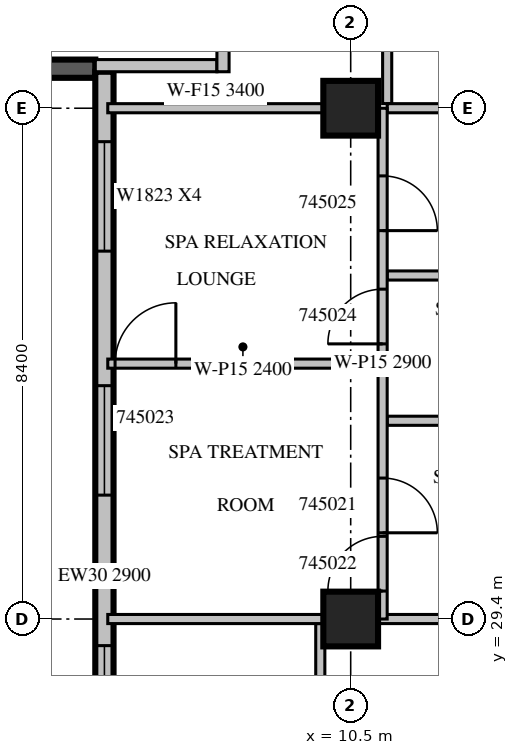
"""IFC4 building model, lengths in metres.
Left out: names, types, materials, properties, quantities, classifications, styles, units other than length and angle.
Written with IfcOpenShell. Run it as: python <this file> out.ifc"""

import sys

from ifc_helpers import new_model, si_unit, direction, frame, frame_2d, origin, origin_2d, place, context, subcontext, project, spatial, rectangle, extrude, source, transform, mapped, element, fill, save


model = new_model("IFC4")
c1 = context("Model", 3, precision=1e-05, world=origin(), true_north=direction((0.0, 1.0)))
c2 = subcontext(c1, "Body", "Model", "MODEL_VIEW")
j1 = project(units=[si_unit("LENGTHUNIT", "METRE"), si_unit("PLANEANGLEUNIT", "RADIAN")], contexts=[c1])
p1 = place(None, origin())
s1 = spatial("IfcSite", under=j1, at=p1, CompositionType="ELEMENT")
p2 = place(p1, origin())
s2 = spatial("IfcBuilding", under=s1, at=p2, CompositionType="ELEMENT")
p3 = place(p2, frame((0.0, 0.0, 204.4)))
s3 = spatial("IfcBuildingStorey", under=s2, at=p3, CompositionType="ELEMENT", Elevation=204.4)
m1 = source(origin(), c2, "Body", "SweptSolid", [
    extrude(rectangle(XDim=0.9, YDim=0.9, at=origin_2d()), origin(), (0.0, 0.0, 1.0), 3.8),
])
for number, where, z_axis, x_axis in (
    (1, (10.5, 29.4, 0.0), (0.0, 0.0, 1.0), (1.0, 0.0, 0.0)),
    (2, (10.5, 37.8, 0.0), (0.0, 0.0, 1.0), (1.0, 0.0, 0.0)),
):
    element("IfcColumn", number, at=place(p3, frame(where, z_axis=z_axis, x_axis=x_axis)), inside=s3, PredefinedType="COLUMN", context=c2, shape_type="MappedRepresentation", body=[
        mapped(m1, transform((0.0, 0.0, 0.0), scale=1.0)),
    ])
m2 = source(origin(), c2, "Body", "SweptSolid", [
    extrude(rectangle(XDim=6.1, YDim=0.3, at=frame_2d((3.05, 0.0))), origin(), (0.0, 0.0, 1.0), 3.4),
])
p4 = place(p3, frame((0.2, 38.45, 0.0), z_axis=(0.0, 0.0, 1.0), x_axis=(1.0, 0.0, 0.0)))
e3 = element("IfcWall", 3, at=p4, inside=s3, PredefinedType="SOLIDWALL", context=c2, shape_type="MappedRepresentation", body=[
    mapped(m2, transform((0.0, 0.0, 0.0), scale=1.0)),
])
p5 = place(p3, frame((6.45, 38.4, 0.0), z_axis=(0.0, 0.0, 1.0), x_axis=(0.0, -1.0, 0.0)))
e4 = element("IfcWall", 4, at=p5, inside=s3, PredefinedType="STANDARD", context=c2, shape_type="SweptSolid", body=[
    extrude(rectangle(XDim=16.6, YDim=0.3, at=frame_2d((8.3, 0.0))), origin(), (0.0, 0.0, 1.0), 2.9),
])
m3 = source(origin(), c2, "Body", "SweptSolid", [
    extrude(rectangle(XDim=1.8, YDim=2.3, at=frame_2d((0.9, 1.15))), frame((0.0, 0.16, 0.0), z_axis=(0.0, -1.0, 0.0), x_axis=(1.0, 0.0, 0.0)), (0.0, 0.0, 1.0), 0.32),
])
p6 = place(p5, frame((1.15, 0.0, 0.6)))
e5 = element("IfcOpeningElement", 5, at=p6, cuts=e4, PredefinedType="OPENING", context=c2, shape_type="MappedRepresentation", body=[
    mapped(m3, transform((0.0, 0.0, 0.0), scale=1.0)),
])
p7 = place(p5, frame((5.162, 0.0, 0.6)))
e6 = element("IfcOpeningElement", 6, at=p7, cuts=e4, PredefinedType="OPENING", context=c2, shape_type="MappedRepresentation", body=[
    mapped(m3, transform((0.0, 0.0, 0.0), scale=1.0)),
])
p8 = place(p5, frame((9.438, 0.0, 0.6)))
e7 = element("IfcOpeningElement", 7, at=p8, cuts=e4, PredefinedType="OPENING", context=c2, shape_type="MappedRepresentation", body=[
    mapped(m3, transform((0.0, 0.0, 0.0), scale=1.0)),
])
m4 = source(origin(), c2, "Body", "SweptSolid", [
    extrude(rectangle(XDim=1.2, YDim=2.3, at=frame_2d((0.6, 1.15))), frame((0.0, 0.16, 0.0), z_axis=(0.0, -1.0, 0.0), x_axis=(1.0, 0.0, 0.0)), (0.0, 0.0, 1.0), 0.32),
])
p9 = place(p5, frame((14.338, 0.0, 0.6)))
e8 = element("IfcOpeningElement", 8, at=p9, cuts=e4, PredefinedType="OPENING", context=c2, shape_type="MappedRepresentation", body=[
    mapped(m4, transform((0.0, 0.0, 0.0), scale=1.0)),
])
p10 = place(p5, frame((11.887, 0.0, 0.6)))
e9 = element("IfcOpeningElement", 9, at=p10, cuts=e4, PredefinedType="OPENING", context=c2, shape_type="MappedRepresentation", body=[
    mapped(m3, transform((0.0, 0.0, 0.0), scale=1.0)),
])
m5 = source(origin(), c2, "Body", "SweptSolid", [
    extrude(rectangle(XDim=2.0, YDim=0.2, at=frame_2d((1.0, 0.0))), origin(), (0.0, 0.0, 1.0), 3.4),
])
p11 = place(p3, frame((6.3, 38.5, 0.0), z_axis=(0.0, 0.0, 1.0), x_axis=(1.0, 0.0, 0.0)))
e10 = element("IfcWall", 10, at=p11, inside=s3, PredefinedType="PARTITIONING", context=c2, shape_type="MappedRepresentation", body=[
    mapped(m5, transform((0.0, 0.0, 0.0), scale=1.0)),
])
m6 = source(origin(), c2, "Body", "SweptSolid", [
    extrude(rectangle(XDim=5.45, YDim=0.2, at=frame_2d((2.725, 0.0))), origin(), (0.0, 0.0, 1.0), 3.4),
])
p12 = place(p3, frame((8.4, 38.4, 0.0), z_axis=(0.0, 0.0, 1.0), x_axis=(0.0, 1.0, 0.0)))
e11 = element("IfcWall", 11, at=p12, inside=s3, PredefinedType="PARTITIONING", context=c2, shape_type="MappedRepresentation", body=[
    mapped(m6, transform((0.0, 0.0, 0.0), scale=1.0)),
])
m7 = source(origin(), c2, "Body", "SweptSolid", [
    extrude(rectangle(XDim=1.2, YDim=2.1, at=frame_2d((0.6, 1.05))), frame((0.0, 0.11, 0.0), z_axis=(0.0, -1.0, 0.0), x_axis=(1.0, 0.0, 0.0)), (0.0, 0.0, 1.0), 0.22),
])
p13 = place(p12, frame((0.4, 0.0, 0.0)))
e12 = element("IfcOpeningElement", 12, at=p13, cuts=e11, PredefinedType="OPENING", context=c2, shape_type="MappedRepresentation", body=[
    mapped(m7, transform((0.0, 0.0, 0.0), scale=1.0)),
])
m8 = source(origin(), c2, "Body", "SweptSolid", [
    extrude(rectangle(XDim=0.9, YDim=2.1, at=frame_2d((0.45, 1.05))), frame((0.0, 0.11, 0.0), z_axis=(0.0, -1.0, 0.0), x_axis=(1.0, 0.0, 0.0)), (0.0, 0.0, 1.0), 0.22),
])
p14 = place(p12, frame((3.25, 0.0, 0.0)))
e13 = element("IfcOpeningElement", 13, at=p14, cuts=e11, PredefinedType="OPENING", context=c2, shape_type="MappedRepresentation", body=[
    mapped(m8, transform((0.0, 0.0, 0.0), scale=1.0)),
])
m9 = source(origin(), c2, "Body", "SweptSolid", [
    extrude(rectangle(XDim=4.85, YDim=0.15, at=frame_2d((2.425, 0.0))), origin(), (0.0, 0.0, 1.0), 3.4),
])
p15 = place(p3, frame((10.0, 24.475, 0.0), z_axis=(0.0, 0.0, 1.0), x_axis=(0.0, 1.0, 0.0)))
e14 = element("IfcWall", 14, at=p15, inside=s3, PredefinedType="PARTITIONING", context=c2, shape_type="MappedRepresentation", body=[
    mapped(m9, transform((0.0, 0.0, 0.0), scale=1.0)),
])
m10 = source(origin(), c2, "Body", "SweptSolid", [
    extrude(rectangle(XDim=3.546, YDim=0.15, at=frame_2d((1.773, 0.0))), origin(), (0.0, 0.0, 1.0), 3.4),
])
p16 = place(p3, frame((10.051, 29.4, 0.0), z_axis=(0.0, 0.0, 1.0), x_axis=(-1.0, 0.0, 0.0)))
e15 = element("IfcWall", 15, at=p16, inside=s3, PredefinedType="PARTITIONING", context=c2, shape_type="MappedRepresentation", body=[
    mapped(m10, transform((0.0, 0.0, 0.0), scale=1.0)),
])
m11 = source(origin(), c2, "Body", "SweptSolid", [
    extrude(rectangle(XDim=4.051, YDim=0.15, at=frame_2d((2.026, 0.0))), origin(), (0.0, 0.0, 1.0), 3.4),
])
p17 = place(p3, frame((15.0, 29.4, 0.0), z_axis=(0.0, 0.0, 1.0), x_axis=(-1.0, 0.0, 0.0)))
e16 = element("IfcWall", 16, at=p17, inside=s3, PredefinedType="PARTITIONING", context=c2, shape_type="MappedRepresentation", body=[
    mapped(m11, transform((0.0, 0.0, 0.0), scale=1.0)),
])
m12 = source(origin(), c2, "Body", "SweptSolid", [
    extrude(rectangle(XDim=6.45, YDim=0.15, at=frame_2d((3.225, 0.0))), origin(), (0.0, 0.0, 1.0), 3.4),
])
p18 = place(p3, frame((11.1, 44.325, 0.0), z_axis=(0.0, 0.0, 1.0), x_axis=(0.0, -1.0, 0.0)))
e17 = element("IfcWall", 17, at=p18, inside=s3, PredefinedType="PARTITIONING", context=c2, shape_type="MappedRepresentation", body=[
    mapped(m12, transform((0.0, 0.0, 0.0), scale=1.0)),
])
p19 = place(p3, frame((10.95, 33.6, 0.0), z_axis=(0.0, 0.0, 1.0), x_axis=(-1.0, 0.0, 0.0)))
e18 = element("IfcWall", 18, at=p19, inside=s3, PredefinedType="PARTITIONING", context=c2, shape_type="SweptSolid", body=[
    extrude(rectangle(XDim=4.445, YDim=0.15, at=frame_2d((2.223, 0.0))), origin(), (0.0, 0.0, 1.0), 2.4),
])
m13 = source(origin(), c2, "Body", "SweptSolid", [
    extrude(rectangle(XDim=1.0, YDim=2.1, at=frame_2d((0.5, 1.05))), frame((0.0, 0.085, 0.0), z_axis=(0.0, -1.0, 0.0), x_axis=(1.0, 0.0, 0.0)), (0.0, 0.0, 1.0), 0.17),
])
p20 = place(p19, frame((3.325, 0.0, 0.0)))
e19 = element("IfcOpeningElement", 19, at=p20, cuts=e18, PredefinedType="OPENING", context=c2, shape_type="MappedRepresentation", body=[
    mapped(m13, transform((0.0, 0.0, 0.0), scale=1.0)),
])
m14 = source(origin(), c2, "Body", "SweptSolid", [
    extrude(rectangle(XDim=3.9, YDim=0.15, at=frame_2d((1.95, 0.0))), origin(), (0.0, 0.0, 1.0), 3.4),
])
for number, where, z_axis, x_axis in (
    (20, (15.0, 32.66, 0.0), (0.0, 0.0, 1.0), (-1.0, 0.0, 0.0)),
    (21, (15.0, 35.049, 0.0), (0.0, 0.0, 1.0), (-1.0, 0.0, 0.0)),
):
    element("IfcWall", number, at=place(p3, frame(where, z_axis=z_axis, x_axis=x_axis)), inside=s3, PredefinedType="PARTITIONING", context=c2, shape_type="MappedRepresentation", body=[
        mapped(m14, transform((0.0, 0.0, 0.0), scale=1.0)),
    ])
p21 = place(p3, frame((10.051, 37.8, 0.0), z_axis=(0.0, 0.0, 1.0), x_axis=(-1.0, 0.0, 0.0)))
e22 = element("IfcWall", 22, at=p21, inside=s3, PredefinedType="PARTITIONING", context=c2, shape_type="MappedRepresentation", body=[
    mapped(m10, transform((0.0, 0.0, 0.0), scale=1.0)),
])
p22 = place(p3, frame((15.0, 37.8, 0.0), z_axis=(0.0, 0.0, 1.0), x_axis=(-1.0, 0.0, 0.0)))
e23 = element("IfcWall", 23, at=p22, inside=s3, PredefinedType="PARTITIONING", context=c2, shape_type="MappedRepresentation", body=[
    mapped(m14, transform((0.0, 0.0, 0.0), scale=1.0)),
])
m15 = source(origin(), c2, "Body", "SweptSolid", [
    extrude(rectangle(XDim=8.4, YDim=0.15, at=frame_2d((4.2, 0.0))), origin(), (0.0, 0.0, 1.0), 2.9),
])
p23 = place(p3, frame((11.025, 29.4, 0.0), z_axis=(0.0, 0.0, 1.0), x_axis=(0.0, 1.0, 0.0)))
e24 = element("IfcWall", 24, at=p23, inside=s3, PredefinedType="PARTITIONING", context=c2, shape_type="MappedRepresentation", body=[
    mapped(m15, transform((0.0, 0.0, 0.0), scale=1.0)),
])
m16 = source(origin(), c2, "Body", "SweptSolid", [
    extrude(rectangle(XDim=0.9, YDim=2.1, at=frame_2d((0.45, 1.05))), frame((0.0, 0.085, 0.0), z_axis=(0.0, -1.0, 0.0), x_axis=(1.0, 0.0, 0.0)), (0.0, 0.0, 1.0), 0.17),
])
p24 = place(p23, frame((1.418, 0.0, 0.0)))
e25 = element("IfcOpeningElement", 25, at=p24, cuts=e24, PredefinedType="OPENING", context=c2, shape_type="MappedRepresentation", body=[
    mapped(m16, transform((0.0, 0.0, 0.0), scale=1.0)),
])
p25 = place(p23, frame((0.46, 0.0, 0.0)))
e26 = element("IfcOpeningElement", 26, at=p25, cuts=e24, PredefinedType="OPENING", context=c2, shape_type="MappedRepresentation", body=[
    mapped(m16, transform((0.0, 0.0, 0.0), scale=1.0)),
])
p26 = place(p23, frame((4.525, 0.0, 0.0)))
e27 = element("IfcOpeningElement", 27, at=p26, cuts=e24, PredefinedType="OPENING", context=c2, shape_type="MappedRepresentation", body=[
    mapped(m16, transform((0.0, 0.0, 0.0), scale=1.0)),
])
p27 = place(p23, frame((6.387, 0.0, 0.0)))
e28 = element("IfcOpeningElement", 28, at=p27, cuts=e24, PredefinedType="OPENING", context=c2, shape_type="MappedRepresentation", body=[
    mapped(m16, transform((0.0, 0.0, 0.0), scale=1.0)),
])
m17 = source(origin(), c2, "Body", "SweptSolid", [
    extrude(rectangle(XDim=1.8, YDim=2.3, at=frame_2d((0.9, 1.15))), frame((0.0, 0.03, 0.0), z_axis=(0.0, -1.0, 0.0), x_axis=(1.0, 0.0, 0.0)), (0.0, 0.0, 1.0), 0.06),
])
p28 = place(p6, origin())
e29 = element("IfcWindow", 29, at=p28, inside=s3, PartitioningType="SINGLE_PANEL", PredefinedType="WINDOW", context=c2, shape_type="MappedRepresentation", body=[
    mapped(m17, transform((0.0, 0.0, 0.0), scale=1.0)),
])
fill(e5, e29)
p29 = place(p7, origin())
e30 = element("IfcWindow", 30, at=p29, inside=s3, PartitioningType="SINGLE_PANEL", PredefinedType="WINDOW", context=c2, shape_type="MappedRepresentation", body=[
    mapped(m17, transform((0.0, 0.0, 0.0), scale=1.0)),
])
fill(e6, e30)
p30 = place(p8, origin())
e31 = element("IfcWindow", 31, at=p30, inside=s3, PartitioningType="SINGLE_PANEL", PredefinedType="WINDOW", context=c2, shape_type="MappedRepresentation", body=[
    mapped(m17, transform((0.0, 0.0, 0.0), scale=1.0)),
])
fill(e7, e31)
m18 = source(origin(), c2, "Body", "SweptSolid", [
    extrude(rectangle(XDim=0.9, YDim=2.1, at=frame_2d((0.45, 1.05))), frame((0.0, 0.025, 0.0), z_axis=(0.0, -1.0, 0.0), x_axis=(1.0, 0.0, 0.0)), (0.0, 0.0, 1.0), 0.05),
])
p31 = place(p24, origin())
e32 = element("IfcDoor", 32, at=p31, inside=s3, OperationType="SINGLE_SWING_RIGHT", PredefinedType="DOOR", context=c2, shape_type="MappedRepresentation", body=[
    mapped(m18, transform((0.0, 0.0, 0.0), scale=1.0)),
])
fill(e25, e32)
p32 = place(p25, origin())
e33 = element("IfcDoor", 33, at=p32, inside=s3, OperationType="SINGLE_SWING_LEFT", PredefinedType="DOOR", context=c2, shape_type="MappedRepresentation", body=[
    mapped(m18, transform((0.0, 0.0, 0.0), scale=1.0)),
])
fill(e26, e33)
m19 = source(origin(), c2, "Body", "SweptSolid", [
    extrude(rectangle(XDim=1.0, YDim=2.1, at=frame_2d((0.5, 1.05))), frame((0.0, 0.025, 0.0), z_axis=(0.0, -1.0, 0.0), x_axis=(1.0, 0.0, 0.0)), (0.0, 0.0, 1.0), 0.05),
])
p33 = place(p20, origin())
e34 = element("IfcDoor", 34, at=p33, inside=s3, OperationType="SINGLE_SWING_RIGHT", PredefinedType="DOOR", context=c2, shape_type="MappedRepresentation", body=[
    mapped(m19, transform((0.0, 0.0, 0.0), scale=1.0)),
])
fill(e19, e34)
p34 = place(p26, origin())
e35 = element("IfcDoor", 35, at=p34, inside=s3, OperationType="SINGLE_SWING_LEFT", PredefinedType="DOOR", context=c2, shape_type="MappedRepresentation", body=[
    mapped(m18, transform((0.0, 0.0, 0.0), scale=1.0)),
])
fill(e27, e35)
p35 = place(p27, origin())
e36 = element("IfcDoor", 36, at=p35, inside=s3, OperationType="SINGLE_SWING_RIGHT", PredefinedType="DOOR", context=c2, shape_type="MappedRepresentation", body=[
    mapped(m18, transform((0.0, 0.0, 0.0), scale=1.0)),
])
fill(e28, e36)
save(model, sys.argv[1])
